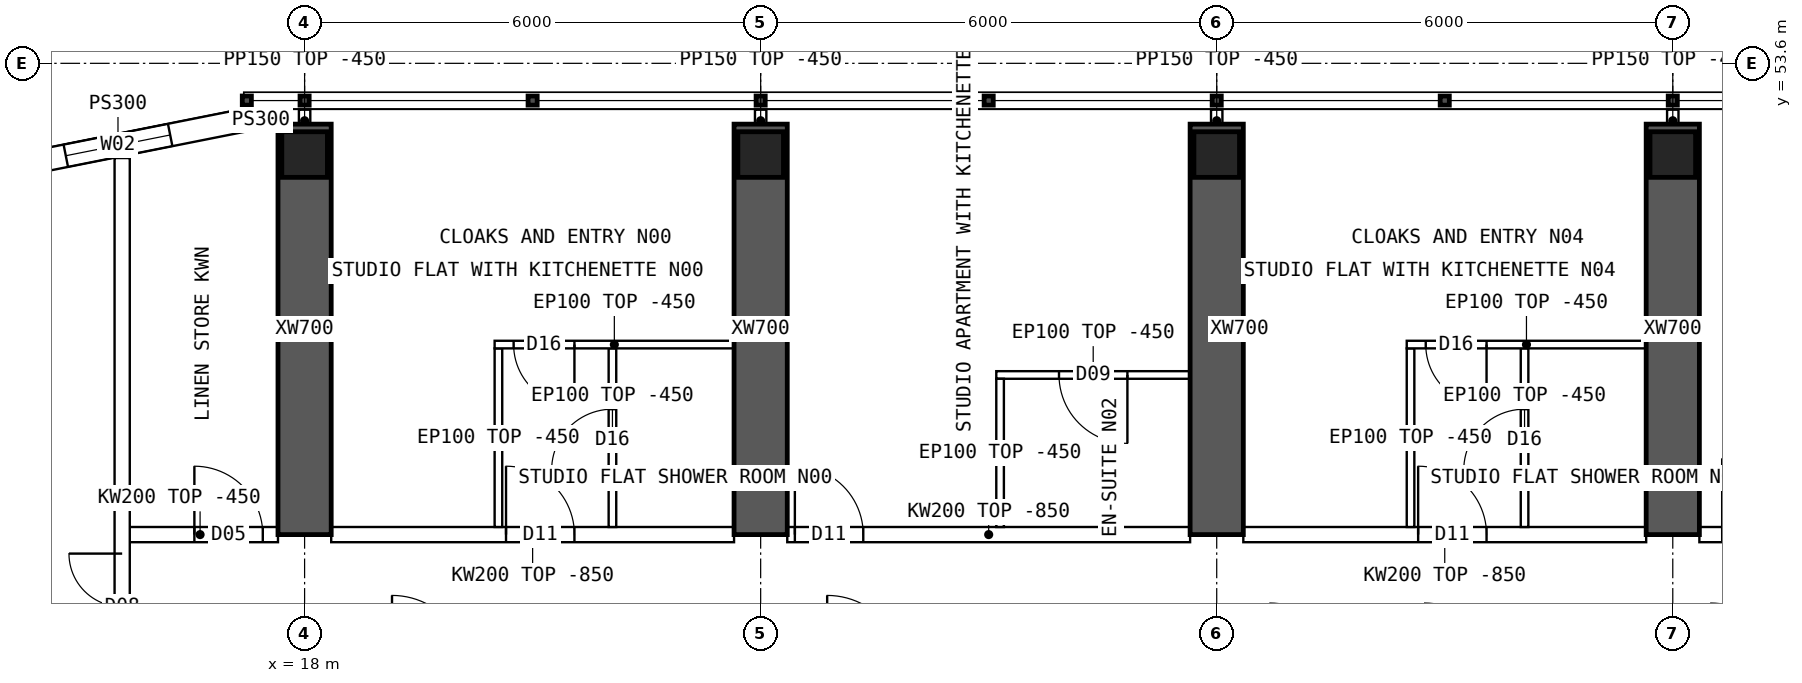
"""IFC4 building model, lengths in metres.
Left out: names, types, materials, properties, quantities, classifications, styles, units other than length and angle.
Written with IfcOpenShell. Run it as: python <this file> out.ifc"""

import sys

from ifc_helpers import new_model, si_unit, direction, frame, frame_2d, origin, origin_2d, place, context, subcontext, project, spatial, polyline, rectangle, hollow_rectangle, outline, extrude, element, fill, save


model = new_model("IFC4")
c1 = context("Model", 3, precision=1e-05, world=origin(), true_north=direction((0.0, 1.0)))
c2 = subcontext(c1, "Body", "Model", "MODEL_VIEW")
j1 = project(units=[si_unit("LENGTHUNIT", "METRE"), si_unit("PLANEANGLEUNIT", "RADIAN")], contexts=[c1])
p1 = place(None, origin())
s1 = spatial("IfcSite", under=j1, at=p1, CompositionType="ELEMENT")
p2 = place(p1, origin())
s2 = spatial("IfcBuilding", under=s1, at=p2, CompositionType="ELEMENT")
p3 = place(p2, frame((0.0, 0.0, 227.8)))
s3 = spatial("IfcBuildingStorey", under=s2, at=p3, CompositionType="ELEMENT", Elevation=227.8)
for number, where, z_axis, x_axis in (
    (1, (18.0, 52.4, 0.0), (0.0, 0.0, 1.0), (1.0, 0.0, 0.0)),
    (2, (24.0, 52.4, 0.0), (0.0, 0.0, 1.0), (1.0, 0.0, 0.0)),
    (3, (30.0, 52.4, 0.0), (0.0, 0.0, 1.0), (1.0, 0.0, 0.0)),
    (4, (36.0, 52.4, 0.0), (0.0, 0.0, 1.0), (1.0, 0.0, 0.0)),
):
    element("IfcColumn", number, at=place(p3, frame(where, z_axis=z_axis, x_axis=x_axis)), inside=s3, PredefinedType="COLUMN", context=c2, shape_type="SweptSolid", body=[
        extrude(hollow_rectangle(XDim=0.6, YDim=0.6, WallThickness=0.06, at=origin_2d()), origin(), (0.0, 0.0, 1.0), 3.75),
    ])
for number, where, z_axis, x_axis in (
    (5, (18.0, 47.4, 0.0), (0.0, 0.0, 1.0), (0.0, 1.0, 0.0)),
    (6, (24.0, 47.4, 0.0), (0.0, 0.0, 1.0), (0.0, 1.0, 0.0)),
    (7, (30.0, 47.4, 0.0), (0.0, 0.0, 1.0), (0.0, 1.0, 0.0)),
    (8, (36.0, 47.4, 0.0), (0.0, 0.0, 1.0), (0.0, 1.0, 0.0)),
):
    element("IfcWall", number, at=place(p3, frame(where, z_axis=z_axis, x_axis=x_axis)), inside=s3, PredefinedType="SHEAR", context=c2, shape_type="SweptSolid", body=[
        extrude(rectangle(XDim=5.4, YDim=0.7, at=frame_2d((2.7, 0.0))), origin(), (0.0, 0.0, 1.0), 3.75),
    ])
p4 = place(p3, frame((17.2, 52.85, 0.0), z_axis=(0.0, 0.0, 1.0), x_axis=(-0.98078325777, -0.195100490205, 0.0)))
e9 = element("IfcWall", 9, at=p4, inside=s3, PredefinedType="SOLIDWALL", context=c2, shape_type="SweptSolid", body=[
    extrude(outline(polyline([(-0.03, -0.15), (3.405, -0.15), (3.345, 0.15), (0.03, 0.15), (-0.03, -0.15)])), origin(), (0.0, 0.0, 1.0), 3.3),
])
p5 = place(p4, frame((0.988, 0.0, 0.9)))
e10 = element("IfcOpeningElement", 10, at=p5, cuts=e9, PredefinedType="OPENING", context=c2, shape_type="SweptSolid", body=[
    extrude(rectangle(XDim=1.4, YDim=1.8, at=frame_2d((0.7, 0.9))), frame((0.0, 0.16, 0.0), z_axis=(0.0, -1.0, 0.0), x_axis=(1.0, 0.0, 0.0)), (0.0, 0.0, 1.0), 0.32),
])
p6 = place(p3, frame((17.2, 52.85, 0.0), z_axis=(0.0, 0.0, 1.0), x_axis=(1.0, 0.0, 0.0)))
e11 = element("IfcWall", 11, at=p6, inside=s3, PredefinedType="SOLIDWALL", context=c2, shape_type="SweptSolid", body=[
    extrude(rectangle(XDim=0.45, YDim=0.3, at=frame_2d((0.225, 0.0))), origin(), (0.0, 0.0, 1.0), 3.3),
])
p7 = place(p3, frame((15.6, 47.4, 0.0), z_axis=(0.0, 0.0, 1.0), x_axis=(1.0, 0.0, 0.0)))
e12 = element("IfcWall", 12, at=p7, inside=s3, PredefinedType="SOLIDWALL", context=c2, shape_type="SweptSolid", body=[
    extrude(rectangle(XDim=2.05, YDim=0.2, at=frame_2d((1.025, 0.0))), origin(), (0.0, 0.0, 1.0), 3.3),
])
p8 = place(p7, frame((0.95, 0.0, 0.0)))
e13 = element("IfcOpeningElement", 13, at=p8, cuts=e12, PredefinedType="OPENING", context=c2, shape_type="SweptSolid", body=[
    extrude(rectangle(XDim=0.9, YDim=2.1, at=frame_2d((0.45, 1.05))), frame((0.0, 0.11, 0.0), z_axis=(0.0, -1.0, 0.0), x_axis=(1.0, 0.0, 0.0)), (0.0, 0.0, 1.0), 0.22),
])
p9 = place(p3, frame((18.35, 47.4, 0.0), z_axis=(0.0, 0.0, 1.0), x_axis=(1.0, 0.0, 0.0)))
e14 = element("IfcWall", 14, at=p9, inside=s3, PredefinedType="SOLIDWALL", context=c2, shape_type="SweptSolid", body=[
    extrude(outline(polyline([(0.0, 0.0), (5.3, 0.0), (5.3, 2.9), (0.0, 2.9), (0.0, 0.0)])), frame((0.0, 0.1, 0.0), z_axis=(0.0, -1.0, 0.0), x_axis=(1.0, 0.0, 0.0)), (0.0, 0.0, 1.0), 0.2),
])
p10 = place(p9, frame((2.3, 0.0, 0.0)))
e15 = element("IfcOpeningElement", 15, at=p10, cuts=e14, PredefinedType="OPENING", context=c2, shape_type="SweptSolid", body=[
    extrude(rectangle(XDim=0.9, YDim=2.1, at=frame_2d((0.45, 1.05))), frame((0.0, 0.11, 0.0), z_axis=(0.0, -1.0, 0.0), x_axis=(1.0, 0.0, 0.0)), (0.0, 0.0, 1.0), 0.22),
])
p11 = place(p3, frame((24.35, 47.4, 0.0), z_axis=(0.0, 0.0, 1.0), x_axis=(1.0, 0.0, 0.0)))
e16 = element("IfcWall", 16, at=p11, inside=s3, PredefinedType="SOLIDWALL", context=c2, shape_type="SweptSolid", body=[
    extrude(outline(polyline([(0.0, 0.0), (5.3, 0.0), (5.3, 2.9), (0.0, 2.9), (0.0, 0.0)])), frame((0.0, 0.1, 0.0), z_axis=(0.0, -1.0, 0.0), x_axis=(1.0, 0.0, 0.0)), (0.0, 0.0, 1.0), 0.2),
])
p12 = place(p11, frame((0.1, 0.0, 0.0)))
e17 = element("IfcOpeningElement", 17, at=p12, cuts=e16, PredefinedType="OPENING", context=c2, shape_type="SweptSolid", body=[
    extrude(rectangle(XDim=0.9, YDim=2.1, at=frame_2d((0.45, 1.05))), frame((0.0, 0.11, 0.0), z_axis=(0.0, -1.0, 0.0), x_axis=(1.0, 0.0, 0.0)), (0.0, 0.0, 1.0), 0.22),
])
p13 = place(p3, frame((30.35, 47.4, 0.0), z_axis=(0.0, 0.0, 1.0), x_axis=(1.0, 0.0, 0.0)))
e18 = element("IfcWall", 18, at=p13, inside=s3, PredefinedType="SOLIDWALL", context=c2, shape_type="SweptSolid", body=[
    extrude(outline(polyline([(0.0, 0.0), (5.3, 0.0), (5.3, 2.9), (0.0, 2.9), (0.0, 0.0)])), frame((0.0, 0.1, 0.0), z_axis=(0.0, -1.0, 0.0), x_axis=(1.0, 0.0, 0.0)), (0.0, 0.0, 1.0), 0.2),
])
p14 = place(p13, frame((2.3, 0.0, 0.0)))
e19 = element("IfcOpeningElement", 19, at=p14, cuts=e18, PredefinedType="OPENING", context=c2, shape_type="SweptSolid", body=[
    extrude(rectangle(XDim=0.9, YDim=2.1, at=frame_2d((0.45, 1.05))), frame((0.0, 0.11, 0.0), z_axis=(0.0, -1.0, 0.0), x_axis=(1.0, 0.0, 0.0)), (0.0, 0.0, 1.0), 0.22),
])
p15 = place(p3, frame((36.35, 47.4, 0.0), z_axis=(0.0, 0.0, 1.0), x_axis=(1.0, 0.0, 0.0)))
e20 = element("IfcWall", 20, at=p15, inside=s3, PredefinedType="SOLIDWALL", context=c2, shape_type="SweptSolid", body=[
    extrude(outline(polyline([(0.0, 0.0), (5.3, 0.0), (5.3, 2.9), (0.0, 2.9), (0.0, 0.0)])), frame((0.0, 0.1, 0.0), z_axis=(0.0, -1.0, 0.0), x_axis=(1.0, 0.0, 0.0)), (0.0, 0.0, 1.0), 0.2),
])
p16 = place(p15, frame((0.3, 0.0, 0.0)))
e21 = element("IfcOpeningElement", 21, at=p16, cuts=e20, PredefinedType="OPENING", context=c2, shape_type="SweptSolid", body=[
    extrude(rectangle(XDim=1.0, YDim=2.1, at=frame_2d((0.5, 1.05))), frame((0.0, 0.11, 0.0), z_axis=(0.0, -1.0, 0.0), x_axis=(1.0, 0.0, 0.0)), (0.0, 0.0, 1.0), 0.22),
])
p17 = place(p3, frame((20.5, 49.9, 0.0), z_axis=(0.0, 0.0, 1.0), x_axis=(1.0, 0.0, 0.0)))
e22 = element("IfcWall", 22, at=p17, inside=s3, PredefinedType="PARTITIONING", context=c2, shape_type="SweptSolid", body=[
    extrude(rectangle(XDim=3.15, YDim=0.1, at=frame_2d((1.575, 0.0))), origin(), (0.0, 0.0, 1.0), 3.3),
])
p18 = place(p17, frame((0.25, 0.0, 0.0)))
e23 = element("IfcOpeningElement", 23, at=p18, cuts=e22, PredefinedType="OPENING", context=c2, shape_type="SweptSolid", body=[
    extrude(rectangle(XDim=0.8, YDim=2.1, at=frame_2d((0.4, 1.05))), frame((0.0, 0.06, 0.0), z_axis=(0.0, -1.0, 0.0), x_axis=(1.0, 0.0, 0.0)), (0.0, 0.0, 1.0), 0.12),
])
p19 = place(p3, frame((20.55, 49.85, 0.0), z_axis=(0.0, 0.0, 1.0), x_axis=(0.0, -1.0, 0.0)))
e24 = element("IfcWall", 24, at=p19, inside=s3, PredefinedType="PARTITIONING", context=c2, shape_type="SweptSolid", body=[
    extrude(outline(polyline([(0.0, 0.0), (2.35, 0.0), (2.35, 2.9), (2.302, 2.9), (2.3, 3.3), (0.0, 3.3), (0.0, 0.0)])), frame((0.0, 0.05, 0.0), z_axis=(0.0, -1.0, 0.0), x_axis=(1.0, 0.0, 0.0)), (0.0, 0.0, 1.0), 0.1),
])
p20 = place(p3, frame((22.05, 49.85, 0.0), z_axis=(0.0, 0.0, 1.0), x_axis=(0.0, -1.0, 0.0)))
e25 = element("IfcWall", 25, at=p20, inside=s3, PredefinedType="PARTITIONING", context=c2, shape_type="SweptSolid", body=[
    extrude(outline(polyline([(0.0, 0.0), (2.35, 0.0), (2.35, 2.9), (2.302, 2.9), (2.3, 3.3), (0.0, 3.3), (0.0, 0.0)])), frame((0.0, 0.05, 0.0), z_axis=(0.0, -1.0, 0.0), x_axis=(1.0, 0.0, 0.0)), (0.0, 0.0, 1.0), 0.1),
])
p21 = place(p20, frame((0.8, 0.0, 0.0)))
e26 = element("IfcOpeningElement", 26, at=p21, cuts=e25, PredefinedType="OPENING", context=c2, shape_type="SweptSolid", body=[
    extrude(rectangle(XDim=0.8, YDim=2.1, at=frame_2d((0.4, 1.05))), frame((0.0, 0.06, 0.0), z_axis=(0.0, -1.0, 0.0), x_axis=(1.0, 0.0, 0.0)), (0.0, 0.0, 1.0), 0.12),
])
p22 = place(p3, frame((27.1, 49.5, 0.0), z_axis=(0.0, 0.0, 1.0), x_axis=(1.0, 0.0, 0.0)))
e27 = element("IfcWall", 27, at=p22, inside=s3, PredefinedType="PARTITIONING", context=c2, shape_type="SweptSolid", body=[
    extrude(rectangle(XDim=2.55, YDim=0.1, at=frame_2d((1.275, 0.0))), origin(), (0.0, 0.0, 1.0), 3.3),
])
p23 = place(p22, frame((0.825, 0.0, 0.0)))
e28 = element("IfcOpeningElement", 28, at=p23, cuts=e27, PredefinedType="OPENING", context=c2, shape_type="SweptSolid", body=[
    extrude(rectangle(XDim=0.9, YDim=2.1, at=frame_2d((0.45, 1.05))), frame((0.0, 0.06, 0.0), z_axis=(0.0, -1.0, 0.0), x_axis=(1.0, 0.0, 0.0)), (0.0, 0.0, 1.0), 0.12),
])
p24 = place(p3, frame((27.15, 49.45, 0.0), z_axis=(0.0, 0.0, 1.0), x_axis=(0.0, -1.0, 0.0)))
e29 = element("IfcWall", 29, at=p24, inside=s3, PredefinedType="PARTITIONING", context=c2, shape_type="SweptSolid", body=[
    extrude(outline(polyline([(0.0, 0.0), (1.95, 0.0), (1.95, 2.9), (1.902, 2.9), (1.9, 3.3), (0.0, 3.3), (0.0, 0.0)])), frame((0.0, 0.05, 0.0), z_axis=(0.0, -1.0, 0.0), x_axis=(1.0, 0.0, 0.0)), (0.0, 0.0, 1.0), 0.1),
])
p25 = place(p3, frame((32.5, 49.9, 0.0), z_axis=(0.0, 0.0, 1.0), x_axis=(1.0, 0.0, 0.0)))
e30 = element("IfcWall", 30, at=p25, inside=s3, PredefinedType="PARTITIONING", context=c2, shape_type="SweptSolid", body=[
    extrude(rectangle(XDim=3.15, YDim=0.1, at=frame_2d((1.575, 0.0))), origin(), (0.0, 0.0, 1.0), 3.3),
])
p26 = place(p25, frame((0.25, 0.0, 0.0)))
e31 = element("IfcOpeningElement", 31, at=p26, cuts=e30, PredefinedType="OPENING", context=c2, shape_type="SweptSolid", body=[
    extrude(rectangle(XDim=0.8, YDim=2.1, at=frame_2d((0.4, 1.05))), frame((0.0, 0.06, 0.0), z_axis=(0.0, -1.0, 0.0), x_axis=(1.0, 0.0, 0.0)), (0.0, 0.0, 1.0), 0.12),
])
p27 = place(p3, frame((32.55, 49.85, 0.0), z_axis=(0.0, 0.0, 1.0), x_axis=(0.0, -1.0, 0.0)))
e32 = element("IfcWall", 32, at=p27, inside=s3, PredefinedType="PARTITIONING", context=c2, shape_type="SweptSolid", body=[
    extrude(outline(polyline([(0.0, 0.0), (2.35, 0.0), (2.35, 2.9), (2.302, 2.9), (2.3, 3.3), (0.0, 3.3), (0.0, 0.0)])), frame((0.0, 0.05, 0.0), z_axis=(0.0, -1.0, 0.0), x_axis=(1.0, 0.0, 0.0)), (0.0, 0.0, 1.0), 0.1),
])
p28 = place(p3, frame((34.05, 49.85, 0.0), z_axis=(0.0, 0.0, 1.0), x_axis=(0.0, -1.0, 0.0)))
e33 = element("IfcWall", 33, at=p28, inside=s3, PredefinedType="PARTITIONING", context=c2, shape_type="SweptSolid", body=[
    extrude(outline(polyline([(0.0, 0.0), (2.35, 0.0), (2.35, 2.9), (2.302, 2.9), (2.3, 3.3), (0.0, 3.3), (0.0, 0.0)])), frame((0.0, 0.05, 0.0), z_axis=(0.0, -1.0, 0.0), x_axis=(1.0, 0.0, 0.0)), (0.0, 0.0, 1.0), 0.1),
])
p29 = place(p28, frame((0.8, 0.0, 0.0)))
e34 = element("IfcOpeningElement", 34, at=p29, cuts=e33, PredefinedType="OPENING", context=c2, shape_type="SweptSolid", body=[
    extrude(rectangle(XDim=0.8, YDim=2.1, at=frame_2d((0.4, 1.05))), frame((0.0, 0.06, 0.0), z_axis=(0.0, -1.0, 0.0), x_axis=(1.0, 0.0, 0.0)), (0.0, 0.0, 1.0), 0.12),
])
p30 = place(p3, frame((15.6, 11.646, 0.0), z_axis=(0.0, 0.0, 1.0), x_axis=(0.0, 1.0, 0.0)))
e35 = element("IfcWall", 35, at=p30, inside=s3, PredefinedType="SOLIDWALL", context=c2, shape_type="SweptSolid", body=[
    extrude(rectangle(XDim=40.708, YDim=0.2, at=frame_2d((20.354, 0.0))), origin(), (0.0, 0.0, 1.0), 3.3),
])
p31 = place(p30, frame((13.434, 0.0, 0.0)))
e36 = element("IfcOpeningElement", 36, at=p31, cuts=e35, PredefinedType="OPENING", context=c2, shape_type="SweptSolid", body=[
    extrude(rectangle(XDim=1.2, YDim=2.1, at=frame_2d((0.6, 1.05))), frame((0.0, 0.11, 0.0), z_axis=(0.0, -1.0, 0.0), x_axis=(1.0, 0.0, 0.0)), (0.0, 0.0, 1.0), 0.22),
])
p32 = place(p30, frame((26.074, 0.0, 0.0)))
e37 = element("IfcOpeningElement", 37, at=p32, cuts=e35, PredefinedType="OPENING", context=c2, shape_type="SweptSolid", body=[
    extrude(rectangle(XDim=1.2, YDim=2.1, at=frame_2d((0.6, 1.05))), frame((0.0, 0.11, 0.0), z_axis=(0.0, -1.0, 0.0), x_axis=(1.0, 0.0, 0.0)), (0.0, 0.0, 1.0), 0.22),
])
p33 = place(p30, frame((5.104, 0.0, 0.0)))
e38 = element("IfcOpeningElement", 38, at=p33, cuts=e35, PredefinedType="OPENING", context=c2, shape_type="SweptSolid", body=[
    extrude(rectangle(XDim=1.4, YDim=2.1, at=frame_2d((0.7, 1.05))), frame((0.0, 0.11, 0.0), z_axis=(0.0, -1.0, 0.0), x_axis=(1.0, 0.0, 0.0)), (0.0, 0.0, 1.0), 0.22),
])
p34 = place(p30, frame((34.104, 0.0, 0.0)))
e39 = element("IfcOpeningElement", 39, at=p34, cuts=e35, PredefinedType="OPENING", context=c2, shape_type="SweptSolid", body=[
    extrude(rectangle(XDim=1.4, YDim=2.1, at=frame_2d((0.7, 1.05))), frame((0.0, 0.11, 0.0), z_axis=(0.0, -1.0, 0.0), x_axis=(1.0, 0.0, 0.0)), (0.0, 0.0, 1.0), 0.22),
])
for number, where, z_axis, x_axis in (
    (40, (18.0, 52.7, 0.0), (0.0, 0.0, 1.0), (0.0, 1.0, 0.0)),
    (41, (24.0, 52.7, 0.0), (0.0, 0.0, 1.0), (0.0, 1.0, 0.0)),
    (42, (30.0, 52.7, 0.0), (0.0, 0.0, 1.0), (0.0, 1.0, 0.0)),
    (43, (36.0, 52.7, 0.0), (0.0, 0.0, 1.0), (0.0, 1.0, 0.0)),
):
    element("IfcWall", number, at=place(p3, frame(where, z_axis=z_axis, x_axis=x_axis)), inside=s3, PredefinedType="PARTITIONING", context=c2, shape_type="SweptSolid", body=[
        extrude(rectangle(XDim=0.29, YDim=0.15, at=frame_2d((0.145, 0.0))), origin(), (0.0, 0.0, 1.0), 3.3),
    ])
p35 = place(p5, origin())
e44 = element("IfcWindow", 44, at=p35, inside=s3, PartitioningType="SINGLE_PANEL", PredefinedType="WINDOW", context=c2, shape_type="SweptSolid", body=[
    extrude(rectangle(XDim=1.4, YDim=1.8, at=frame_2d((0.7, 0.9))), frame((0.0, 0.03, 0.0), z_axis=(0.0, -1.0, 0.0), x_axis=(1.0, 0.0, 0.0)), (0.0, 0.0, 1.0), 0.06),
])
fill(e10, e44)
p36 = place(p18, origin())
e45 = element("IfcDoor", 45, at=p36, inside=s3, OperationType="SINGLE_SWING_RIGHT", PredefinedType="DOOR", context=c2, shape_type="SweptSolid", body=[
    extrude(rectangle(XDim=0.8, YDim=2.1, at=frame_2d((0.4, 1.05))), frame((0.0, 0.025, 0.0), z_axis=(0.0, -1.0, 0.0), x_axis=(1.0, 0.0, 0.0)), (0.0, 0.0, 1.0), 0.05),
])
fill(e23, e45)
p37 = place(p21, origin())
e46 = element("IfcDoor", 46, at=p37, inside=s3, OperationType="SINGLE_SWING_RIGHT", PredefinedType="DOOR", context=c2, shape_type="SweptSolid", body=[
    extrude(rectangle(XDim=0.8, YDim=2.1, at=frame_2d((0.4, 1.05))), frame((0.0, 0.025, 0.0), z_axis=(0.0, -1.0, 0.0), x_axis=(1.0, 0.0, 0.0)), (0.0, 0.0, 1.0), 0.05),
])
fill(e26, e46)
p38 = place(p10, origin())
e47 = element("IfcDoor", 47, at=p38, inside=s3, OperationType="SINGLE_SWING_LEFT", PredefinedType="DOOR", context=c2, shape_type="SweptSolid", body=[
    extrude(rectangle(XDim=0.9, YDim=2.1, at=frame_2d((0.45, 1.05))), frame((0.0, 0.025, 0.0), z_axis=(0.0, -1.0, 0.0), x_axis=(1.0, 0.0, 0.0)), (0.0, 0.0, 1.0), 0.05),
])
fill(e15, e47)
p39 = place(p23, origin())
e48 = element("IfcDoor", 48, at=p39, inside=s3, OperationType="SINGLE_SWING_RIGHT", PredefinedType="DOOR", context=c2, shape_type="SweptSolid", body=[
    extrude(rectangle(XDim=0.9, YDim=2.1, at=frame_2d((0.45, 1.05))), frame((0.0, 0.025, 0.0), z_axis=(0.0, -1.0, 0.0), x_axis=(1.0, 0.0, 0.0)), (0.0, 0.0, 1.0), 0.05),
])
fill(e28, e48)
p40 = place(p12, origin())
e49 = element("IfcDoor", 49, at=p40, inside=s3, OperationType="SINGLE_SWING_LEFT", PredefinedType="DOOR", context=c2, shape_type="SweptSolid", body=[
    extrude(rectangle(XDim=0.9, YDim=2.1, at=frame_2d((0.45, 1.05))), frame((0.0, 0.025, 0.0), z_axis=(0.0, -1.0, 0.0), x_axis=(1.0, 0.0, 0.0)), (0.0, 0.0, 1.0), 0.05),
])
fill(e17, e49)
p41 = place(p26, origin())
e50 = element("IfcDoor", 50, at=p41, inside=s3, OperationType="SINGLE_SWING_RIGHT", PredefinedType="DOOR", context=c2, shape_type="SweptSolid", body=[
    extrude(rectangle(XDim=0.8, YDim=2.1, at=frame_2d((0.4, 1.05))), frame((0.0, 0.025, 0.0), z_axis=(0.0, -1.0, 0.0), x_axis=(1.0, 0.0, 0.0)), (0.0, 0.0, 1.0), 0.05),
])
fill(e31, e50)
p42 = place(p29, origin())
e51 = element("IfcDoor", 51, at=p42, inside=s3, OperationType="SINGLE_SWING_RIGHT", PredefinedType="DOOR", context=c2, shape_type="SweptSolid", body=[
    extrude(rectangle(XDim=0.8, YDim=2.1, at=frame_2d((0.4, 1.05))), frame((0.0, 0.025, 0.0), z_axis=(0.0, -1.0, 0.0), x_axis=(1.0, 0.0, 0.0)), (0.0, 0.0, 1.0), 0.05),
])
fill(e34, e51)
p43 = place(p14, origin())
e52 = element("IfcDoor", 52, at=p43, inside=s3, OperationType="SINGLE_SWING_LEFT", PredefinedType="DOOR", context=c2, shape_type="SweptSolid", body=[
    extrude(rectangle(XDim=0.9, YDim=2.1, at=frame_2d((0.45, 1.05))), frame((0.0, 0.025, 0.0), z_axis=(0.0, -1.0, 0.0), x_axis=(1.0, 0.0, 0.0)), (0.0, 0.0, 1.0), 0.05),
])
fill(e19, e52)
p44 = place(p34, origin())
e53 = element("IfcDoor", 53, at=p44, inside=s3, OperationType="DOUBLE_DOOR_SINGLE_SWING", PredefinedType="DOOR", context=c2, shape_type="SweptSolid", body=[
    extrude(rectangle(XDim=1.4, YDim=2.1, at=frame_2d((0.7, 1.05))), frame((0.0, 0.025, 0.0), z_axis=(0.0, -1.0, 0.0), x_axis=(1.0, 0.0, 0.0)), (0.0, 0.0, 1.0), 0.05),
])
fill(e39, e53)
p45 = place(p8, origin())
e54 = element("IfcDoor", 54, at=p45, inside=s3, OperationType="SINGLE_SWING_LEFT", PredefinedType="DOOR", context=c2, shape_type="SweptSolid", body=[
    extrude(rectangle(XDim=0.9, YDim=2.1, at=frame_2d((0.45, 1.05))), frame((0.0, 0.025, 0.0), z_axis=(0.0, -1.0, 0.0), x_axis=(1.0, 0.0, 0.0)), (0.0, 0.0, 1.0), 0.05),
])
fill(e13, e54)
save(model, sys.argv[1])
